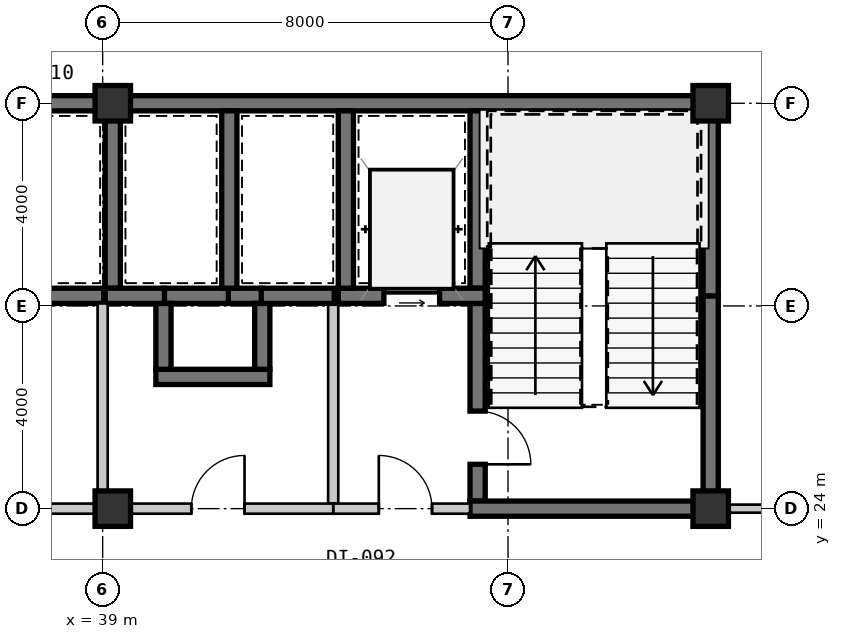
"""IFC4 building model, lengths in metres.
Left out: names, types, materials, properties, quantities, classifications, styles, units other than length and angle.
Written with IfcOpenShell. Run it as: python <this file> out.ifc"""

import sys

from ifc_helpers import new_model, si_unit, direction, frame, frame_2d, origin, origin_2d, place, context, subcontext, project, spatial, rectangle, extrude, source, transform, mapped, element, fill, save


model = new_model("IFC4")
c1 = context("Model", 3, precision=1e-05, world=origin(), true_north=direction((0.0, 1.0)))
c2 = subcontext(c1, "Body", "Model", "MODEL_VIEW")
j1 = project(units=[si_unit("LENGTHUNIT", "METRE"), si_unit("PLANEANGLEUNIT", "RADIAN")], contexts=[c1])
p1 = place(None, origin())
s1 = spatial("IfcSite", under=j1, at=p1, CompositionType="ELEMENT")
p2 = place(p1, origin())
s2 = spatial("IfcBuilding", under=s1, at=p2, CompositionType="ELEMENT")
p3 = place(p2, frame((0.0, 0.0, 74.55)))
s3 = spatial("IfcBuildingStorey", under=s2, at=p3, CompositionType="ELEMENT", Elevation=74.55)
m1 = source(origin(), c2, "Body", "SweptSolid", [
    extrude(rectangle(XDim=0.7, YDim=0.7, at=origin_2d()), origin(), (0.0, 0.0, 1.0), 3.15),
])
for number, where, z_axis, x_axis in (
    (1, (39.2, 24.0, 0.0), (0.0, 0.0, 1.0), (1.0, 0.0, 0.0)),
    (2, (51.0, 24.0, 0.0), (0.0, 0.0, 1.0), (1.0, 0.0, 0.0)),
    (3, (39.2, 32.0, 0.0), (0.0, 0.0, 1.0), (1.0, 0.0, 0.0)),
    (4, (51.0, 32.0, 0.0), (0.0, 0.0, 1.0), (1.0, 0.0, 0.0)),
):
    element("IfcColumn", number, at=place(p3, frame(where, z_axis=z_axis, x_axis=x_axis)), inside=s3, PredefinedType="COLUMN", context=c2, shape_type="MappedRepresentation", body=[
        mapped(m1, transform((0.0, 0.0, 0.0), scale=1.0)),
    ])
m2 = source(origin(), c2, "Body", "SweptSolid", [
    extrude(rectangle(XDim=11.2, YDim=0.3, at=frame_2d((5.6, 0.0))), origin(), (0.0, 0.0, 1.0), 2.93),
])
p4 = place(p3, frame((28.0, 32.0, 0.0), z_axis=(0.0, 0.0, 1.0), x_axis=(1.0, 0.0, 0.0)))
e5 = element("IfcWall", 5, at=p4, inside=s3, PredefinedType="SHEAR", context=c2, shape_type="MappedRepresentation", body=[
    mapped(m2, transform((0.0, 0.0, 0.0), scale=1.0)),
])
m3 = source(origin(), c2, "Body", "SweptSolid", [
    extrude(rectangle(XDim=11.95, YDim=0.3, at=frame_2d((5.975, 0.0))), origin(), (0.0, 0.0, 1.0), 2.93),
])
p5 = place(p3, frame((39.2, 32.0, 0.0), z_axis=(0.0, 0.0, 1.0), x_axis=(1.0, 0.0, 0.0)))
e6 = element("IfcWall", 6, at=p5, inside=s3, PredefinedType="SHEAR", context=c2, shape_type="MappedRepresentation", body=[
    mapped(m3, transform((0.0, 0.0, 0.0), scale=1.0)),
])
m4 = source(origin(), c2, "Body", "SweptSolid", [
    extrude(rectangle(XDim=4.05, YDim=0.3, at=frame_2d((2.025, 0.0))), origin(), (0.0, 0.0, 1.0), 2.93),
])
p6 = place(p3, frame((51.0, 24.15, 0.0), z_axis=(0.0, 0.0, 1.0), x_axis=(0.0, 1.0, 0.0)))
e7 = element("IfcWall", 7, at=p6, inside=s3, PredefinedType="SHEAR", context=c2, shape_type="MappedRepresentation", body=[
    mapped(m4, transform((0.0, 0.0, 0.0), scale=1.0)),
])
m5 = source(origin(), c2, "Body", "SweptSolid", [
    extrude(rectangle(XDim=3.65, YDim=0.3, at=frame_2d((1.825, 0.0))), origin(), (0.0, 0.0, 1.0), 2.93),
])
p7 = place(p3, frame((51.0, 28.2, 0.0), z_axis=(0.0, 0.0, 1.0), x_axis=(0.0, 1.0, 0.0)))
e8 = element("IfcWall", 8, at=p7, inside=s3, PredefinedType="SHEAR", context=c2, shape_type="MappedRepresentation", body=[
    mapped(m5, transform((0.0, 0.0, 0.0), scale=1.0)),
])
m6 = source(origin(), c2, "Body", "SweptSolid", [
    extrude(rectangle(XDim=3.5, YDim=0.3, at=frame_2d((1.75, 0.0))), origin(), (0.0, 0.0, 1.0), 2.93),
])
p8 = place(p3, frame((46.4, 31.85, 0.0), z_axis=(0.0, 0.0, 1.0), x_axis=(0.0, -1.0, 0.0)))
e9 = element("IfcWall", 9, at=p8, inside=s3, PredefinedType="SHEAR", context=c2, shape_type="MappedRepresentation", body=[
    mapped(m6, transform((0.0, 0.0, 0.0), scale=1.0)),
])
m7 = source(origin(), c2, "Body", "SweptSolid", [
    extrude(rectangle(XDim=3.9, YDim=0.3, at=frame_2d((1.95, 0.0))), origin(), (0.0, 0.0, 1.0), 2.93),
])
p9 = place(p3, frame((46.4, 28.05, 0.0), z_axis=(0.0, 0.0, 1.0), x_axis=(0.0, -1.0, 0.0)))
e10 = element("IfcWall", 10, at=p9, inside=s3, PredefinedType="SHEAR", context=c2, shape_type="MappedRepresentation", body=[
    mapped(m7, transform((0.0, 0.0, 0.0), scale=1.0)),
])
m8 = source(origin(), c2, "Body", "SweptSolid", [
    extrude(rectangle(XDim=1.05, YDim=2.1, at=frame_2d((0.525, 1.05))), frame((0.0, 0.16, 0.0), z_axis=(0.0, -1.0, 0.0), x_axis=(1.0, 0.0, 0.0)), (0.0, 0.0, 1.0), 0.32),
])
p10 = place(p9, frame((2.125, 0.0, 0.0)))
e11 = element("IfcOpeningElement", 11, at=p10, cuts=e10, PredefinedType="OPENING", context=c2, shape_type="MappedRepresentation", body=[
    mapped(m8, transform((0.0, 0.0, 0.0), scale=1.0)),
])
m9 = source(origin(), c2, "Body", "SweptSolid", [
    extrude(rectangle(XDim=4.9, YDim=0.3, at=frame_2d((2.45, 0.0))), origin(), (0.0, 0.0, 1.0), 2.93),
])
p11 = place(p3, frame((46.25, 24.0, 0.0), z_axis=(0.0, 0.0, 1.0), x_axis=(1.0, 0.0, 0.0)))
e12 = element("IfcWall", 12, at=p11, inside=s3, PredefinedType="SHEAR", context=c2, shape_type="MappedRepresentation", body=[
    mapped(m9, transform((0.0, 0.0, 0.0), scale=1.0)),
])
m10 = source(origin(), c2, "Body", "SweptSolid", [
    extrude(rectangle(XDim=2.9, YDim=0.3, at=frame_2d((1.45, 0.0))), origin(), (0.0, 0.0, 1.0), 2.93),
])
p12 = place(p3, frame((43.65, 28.2, 0.0), z_axis=(0.0, 0.0, 1.0), x_axis=(1.0, 0.0, 0.0)))
e13 = element("IfcWall", 13, at=p12, inside=s3, PredefinedType="SHEAR", context=c2, shape_type="MappedRepresentation", body=[
    mapped(m10, transform((0.0, 0.0, 0.0), scale=1.0)),
])
m11 = source(origin(), c2, "Body", "SweptSolid", [
    extrude(rectangle(XDim=1.1, YDim=2.15, at=frame_2d((0.55, 1.075))), frame((0.0, 0.16, 0.0), z_axis=(0.0, -1.0, 0.0), x_axis=(1.0, 0.0, 0.0)), (0.0, 0.0, 1.0), 0.32),
])
p13 = place(p12, frame((0.9, 0.0, 0.0)))
e14 = element("IfcOpeningElement", 14, at=p13, cuts=e13, PredefinedType="OPENING", context=c2, shape_type="MappedRepresentation", body=[
    mapped(m11, transform((0.0, 0.0, 0.0), scale=1.0)),
])
p14 = place(p3, frame((43.8, 31.85, 0.0), z_axis=(0.0, 0.0, 1.0), x_axis=(0.0, -1.0, 0.0)))
e15 = element("IfcWall", 15, at=p14, inside=s3, PredefinedType="SHEAR", context=c2, shape_type="MappedRepresentation", body=[
    mapped(m6, transform((0.0, 0.0, 0.0), scale=1.0)),
])
m12 = source(origin(), c2, "Body", "SweptSolid", [
    extrude(rectangle(XDim=3.95, YDim=0.2, at=frame_2d((1.975, 0.0))), origin(), (0.0, 0.0, 1.0), 2.93),
])
p15 = place(p3, frame((43.55, 28.05, 0.0), z_axis=(0.0, 0.0, 1.0), x_axis=(0.0, -1.0, 0.0)))
e16 = element("IfcWall", 16, at=p15, inside=s3, PredefinedType="SOLIDWALL", context=c2, shape_type="MappedRepresentation", body=[
    mapped(m12, transform((0.0, 0.0, 0.0), scale=1.0)),
])
m13 = source(origin(), c2, "Body", "SweptSolid", [
    extrude(rectangle(XDim=2.7, YDim=0.2, at=frame_2d((1.35, 0.0))), origin(), (0.0, 0.0, 1.0), 2.397),
])
p16 = place(p3, frame((43.55, 24.0, 0.0), z_axis=(0.0, 0.0, 1.0), x_axis=(1.0, 0.0, 0.0)))
e17 = element("IfcWall", 17, at=p16, inside=s3, PredefinedType="SOLIDWALL", context=c2, shape_type="MappedRepresentation", body=[
    mapped(m13, transform((0.0, 0.0, 0.0), scale=1.0)),
])
m14 = source(origin(), c2, "Body", "SweptSolid", [
    extrude(rectangle(XDim=1.05, YDim=2.1, at=frame_2d((0.525, 1.05))), frame((0.0, 0.11, 0.0), z_axis=(0.0, -1.0, 0.0), x_axis=(1.0, 0.0, 0.0)), (0.0, 0.0, 1.0), 0.22),
])
p17 = place(p16, frame((0.9, 0.0, 0.0)))
e18 = element("IfcOpeningElement", 18, at=p17, cuts=e17, PredefinedType="OPENING", context=c2, shape_type="MappedRepresentation", body=[
    mapped(m14, transform((0.0, 0.0, 0.0), scale=1.0)),
])
m15 = source(origin(), c2, "Body", "SweptSolid", [
    extrude(rectangle(XDim=1.32, YDim=0.3, at=frame_2d((0.66, 0.0))), origin(), (0.0, 0.0, 1.0), 2.93),
])
p18 = place(p3, frame((41.52, 28.2, 0.0), z_axis=(0.0, 0.0, 1.0), x_axis=(-1.0, 0.0, 0.0)))
e19 = element("IfcWall", 19, at=p18, inside=s3, PredefinedType="SHEAR", context=c2, shape_type="MappedRepresentation", body=[
    mapped(m15, transform((0.0, 0.0, 0.0), scale=1.0)),
])
m16 = source(origin(), c2, "Body", "SweptSolid", [
    extrude(rectangle(XDim=0.67, YDim=0.3, at=frame_2d((0.335, 0.0))), origin(), (0.0, 0.0, 1.0), 2.93),
])
p19 = place(p3, frame((42.15, 28.2, 0.0), z_axis=(0.0, 0.0, 1.0), x_axis=(-1.0, 0.0, 0.0)))
e20 = element("IfcWall", 20, at=p19, inside=s3, PredefinedType="SHEAR", context=c2, shape_type="MappedRepresentation", body=[
    mapped(m16, transform((0.0, 0.0, 0.0), scale=1.0)),
])
m17 = source(origin(), c2, "Body", "SweptSolid", [
    extrude(rectangle(XDim=2.25, YDim=0.3, at=frame_2d((1.125, 0.0))), origin(), (0.0, 0.0, 1.0), 2.93),
])
p20 = place(p3, frame((40.05, 26.6, 0.0), z_axis=(0.0, 0.0, 1.0), x_axis=(1.0, 0.0, 0.0)))
e21 = element("IfcWall", 21, at=p20, inside=s3, PredefinedType="SHEAR", context=c2, shape_type="MappedRepresentation", body=[
    mapped(m17, transform((0.0, 0.0, 0.0), scale=1.0)),
])
m18 = source(origin(), c2, "Body", "SweptSolid", [
    extrude(rectangle(XDim=1.3, YDim=0.3, at=frame_2d((0.65, 0.0))), origin(), (0.0, 0.0, 1.0), 2.93),
])
for number, where, z_axis, x_axis in (
    (22, (40.2, 28.05, 0.0), (0.0, 0.0, 1.0), (0.0, -1.0, 0.0)),
    (23, (42.15, 26.75, 0.0), (0.0, 0.0, 1.0), (0.0, 1.0, 0.0)),
):
    element("IfcWall", number, at=place(p3, frame(where, z_axis=z_axis, x_axis=x_axis)), inside=s3, PredefinedType="SHEAR", context=c2, shape_type="MappedRepresentation", body=[
        mapped(m18, transform((0.0, 0.0, 0.0), scale=1.0)),
    ])
p21 = place(p3, frame((39.2, 28.35, 0.0), z_axis=(0.0, 0.0, 1.0), x_axis=(0.0, 1.0, 0.0)))
e24 = element("IfcWall", 24, at=p21, inside=s3, PredefinedType="SHEAR", context=c2, shape_type="MappedRepresentation", body=[
    mapped(m6, transform((0.0, 0.0, 0.0), scale=1.0)),
])
m19 = source(origin(), c2, "Body", "SweptSolid", [
    extrude(rectangle(XDim=2.32, YDim=0.3, at=frame_2d((1.16, 0.0))), origin(), (0.0, 0.0, 1.0), 2.93),
])
p22 = place(p3, frame((36.7, 28.2, 0.0), z_axis=(0.0, 0.0, 1.0), x_axis=(1.0, 0.0, 0.0)))
e25 = element("IfcWall", 25, at=p22, inside=s3, PredefinedType="SHEAR", context=c2, shape_type="MappedRepresentation", body=[
    mapped(m19, transform((0.0, 0.0, 0.0), scale=1.0)),
])
p23 = place(p3, frame((41.5, 28.35, 0.0), z_axis=(0.0, 0.0, 1.0), x_axis=(0.0, 1.0, 0.0)))
e26 = element("IfcWall", 26, at=p23, inside=s3, PredefinedType="SHEAR", context=c2, shape_type="MappedRepresentation", body=[
    mapped(m6, transform((0.0, 0.0, 0.0), scale=1.0)),
])
m20 = source(origin(), c2, "Body", "SweptSolid", [
    extrude(rectangle(XDim=1.17, YDim=0.3, at=frame_2d((0.585, 0.0))), origin(), (0.0, 0.0, 1.0), 2.93),
])
p24 = place(p3, frame((39.05, 28.2, 0.0), z_axis=(0.0, 0.0, 1.0), x_axis=(1.0, 0.0, 0.0)))
e27 = element("IfcWall", 27, at=p24, inside=s3, PredefinedType="SHEAR", context=c2, shape_type="MappedRepresentation", body=[
    mapped(m20, transform((0.0, 0.0, 0.0), scale=1.0)),
])
m21 = source(origin(), c2, "Body", "SweptSolid", [
    extrude(rectangle(XDim=1.44, YDim=0.3, at=frame_2d((0.72, 0.0))), origin(), (0.0, 0.0, 1.0), 2.93),
])
p25 = place(p3, frame((42.13, 28.2, 0.0), z_axis=(0.0, 0.0, 1.0), x_axis=(1.0, 0.0, 0.0)))
e28 = element("IfcWall", 28, at=p25, inside=s3, PredefinedType="SHEAR", context=c2, shape_type="MappedRepresentation", body=[
    mapped(m21, transform((0.0, 0.0, 0.0), scale=1.0)),
])
p26 = place(p3, frame((39.0, 28.05, 0.0), z_axis=(0.0, 0.0, 1.0), x_axis=(0.0, -1.0, 0.0)))
e29 = element("IfcWall", 29, at=p26, inside=s3, PredefinedType="SOLIDWALL", context=c2, shape_type="MappedRepresentation", body=[
    mapped(m12, transform((0.0, 0.0, 0.0), scale=1.0)),
])
m22 = source(origin(), c2, "Body", "SweptSolid", [
    extrude(rectangle(XDim=3.85, YDim=0.2, at=frame_2d((1.925, 0.0))), origin(), (0.0, 0.0, 1.0), 2.47),
])
p27 = place(p3, frame((39.0, 24.0, 0.0), z_axis=(0.0, 0.0, 1.0), x_axis=(-1.0, 0.0, 0.0)))
e30 = element("IfcWall", 30, at=p27, inside=s3, PredefinedType="SOLIDWALL", context=c2, shape_type="MappedRepresentation", body=[
    mapped(m22, transform((0.0, 0.0, 0.0), scale=1.0)),
])
p28 = place(p27, frame((1.4, 0.0, 0.0)))
e31 = element("IfcOpeningElement", 31, at=p28, cuts=e30, PredefinedType="OPENING", context=c2, shape_type="MappedRepresentation", body=[
    mapped(m14, transform((0.0, 0.0, 0.0), scale=1.0)),
])
m23 = source(origin(), c2, "Body", "SweptSolid", [
    extrude(rectangle(XDim=4.55, YDim=0.2, at=frame_2d((2.275, 0.0))), origin(), (0.0, 0.0, 1.0), 2.397),
])
p29 = place(p3, frame((43.55, 24.0, 0.0), z_axis=(0.0, 0.0, 1.0), x_axis=(-1.0, 0.0, 0.0)))
e32 = element("IfcWall", 32, at=p29, inside=s3, PredefinedType="SOLIDWALL", context=c2, shape_type="MappedRepresentation", body=[
    mapped(m23, transform((0.0, 0.0, 0.0), scale=1.0)),
])
p30 = place(p29, frame((1.75, 0.0, 0.0)))
e33 = element("IfcOpeningElement", 33, at=p30, cuts=e32, PredefinedType="OPENING", context=c2, shape_type="MappedRepresentation", body=[
    mapped(m14, transform((0.0, 0.0, 0.0), scale=1.0)),
])
m24 = source(origin(), c2, "Body", "SweptSolid", [
    extrude(rectangle(XDim=1.155, YDim=0.16, at=frame_2d((0.577, 0.0))), origin(), (0.0, 0.0, 1.0), 2.328),
])
p31 = place(p3, frame((51.15, 24.0, 0.0), z_axis=(0.0, 0.0, 1.0), x_axis=(1.0, 0.0, 0.0)))
e34 = element("IfcWall", 34, at=p31, inside=s3, PredefinedType="PARTITIONING", context=c2, shape_type="MappedRepresentation", body=[
    mapped(m24, transform((0.0, 0.0, 0.0), scale=1.0)),
])
m25 = source(origin(), c2, "Body", "SweptSolid", [
    extrude(rectangle(XDim=1.05, YDim=2.1, at=frame_2d((0.525, 1.05))), frame((0.0, 0.025, 0.0), z_axis=(0.0, -1.0, 0.0), x_axis=(1.0, 0.0, 0.0)), (0.0, 0.0, 1.0), 0.05),
])
p32 = place(p10, origin())
e35 = element("IfcDoor", 35, at=p32, inside=s3, OperationType="SINGLE_SWING_RIGHT", PredefinedType="DOOR", context=c2, shape_type="MappedRepresentation", body=[
    mapped(m25, transform((0.0, 0.0, 0.0), scale=1.0)),
])
fill(e11, e35)
m26 = source(origin(), c2, "Body", "SweptSolid", [
    extrude(rectangle(XDim=1.1, YDim=2.15, at=frame_2d((0.55, 1.075))), frame((0.0, 0.025, 0.0), z_axis=(0.0, -1.0, 0.0), x_axis=(1.0, 0.0, 0.0)), (0.0, 0.0, 1.0), 0.05),
])
p33 = place(p13, origin())
e36 = element("IfcDoor", 36, at=p33, inside=s3, OperationType="SLIDING_TO_LEFT", PredefinedType="DOOR", context=c2, shape_type="MappedRepresentation", body=[
    mapped(m26, transform((0.0, 0.0, 0.0), scale=1.0)),
])
fill(e14, e36)
p34 = place(p17, origin())
e37 = element("IfcDoor", 37, at=p34, inside=s3, OperationType="SINGLE_SWING_LEFT", PredefinedType="DOOR", context=c2, shape_type="MappedRepresentation", body=[
    mapped(m25, transform((0.0, 0.0, 0.0), scale=1.0)),
])
fill(e18, e37)
p35 = place(p30, frame((1.05, 0.0, 0.0), z_axis=(0.0, 0.0, 1.0), x_axis=(-1.0, 0.0, 0.0)))
e38 = element("IfcDoor", 38, at=p35, inside=s3, OperationType="SINGLE_SWING_RIGHT", PredefinedType="DOOR", context=c2, shape_type="MappedRepresentation", body=[
    mapped(m25, transform((0.0, 0.0, 0.0), scale=1.0)),
])
fill(e33, e38)
save(model, sys.argv[1])
